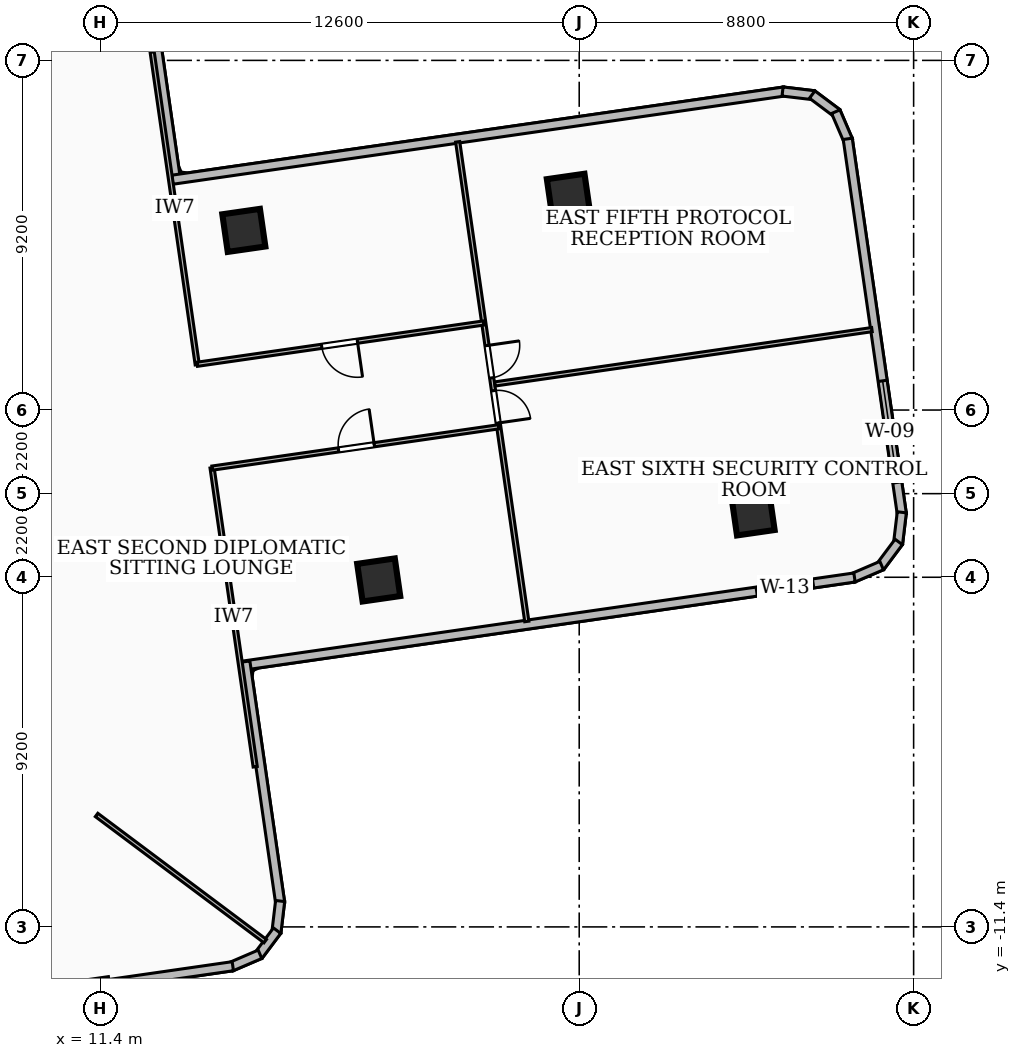
"""IFC4 building model, lengths in metres.
Left out: names, types, materials, properties, quantities, classifications, styles, units other than length and angle.
Written with IfcOpenShell. Run it as: python <this file> out.ifc"""

import sys

from ifc_helpers import new_model, si_unit, direction, frame, frame_2d, origin, origin_2d, place, context, subcontext, project, spatial, rectangle, extrude, element, fill, save


model = new_model("IFC4")
c1 = context("Model", 3, precision=1e-05, world=origin(), true_north=direction((0.0, 1.0)))
c2 = subcontext(c1, "Body", "Model", "MODEL_VIEW")
j1 = project(units=[si_unit("LENGTHUNIT", "METRE"), si_unit("PLANEANGLEUNIT", "RADIAN")], contexts=[c1])
p1 = place(None, origin())
s1 = spatial("IfcSite", under=j1, at=p1, CompositionType="ELEMENT")
p2 = place(p1, origin())
s2 = spatial("IfcBuilding", under=s1, at=p2, CompositionType="ELEMENT")
p3 = place(p2, frame((0.0, 0.0, 89.28)))
s3 = spatial("IfcBuildingStorey", under=s2, at=p3, CompositionType="ELEMENT", Elevation=89.28)
for number, where, z_axis, x_axis in (
    (1, (18.724, -2.271, 0.0), (0.0, 0.0, 1.0), (0.99, 0.143, 0.0)),
    (2, (15.175, 6.927, 0.0), (0.0, 0.0, 1.0), (0.99, 0.143, 0.0)),
    (3, (28.576, -0.533, 0.0), (0.0, 0.0, 1.0), (0.99, 0.143, 0.0)),
    (4, (23.715, 7.851, 0.0), (0.0, 0.0, 1.0), (0.99, 0.143, 0.0)),
):
    element("IfcColumn", number, at=place(p3, frame(where, z_axis=z_axis, x_axis=x_axis)), inside=s3, PredefinedType="COLUMN", context=c2, shape_type="SweptSolid", body=[
        extrude(rectangle(XDim=1.0, YDim=1.0, at=origin_2d()), origin(), (0.0, 0.0, 1.0), 3.6),
    ])
p4 = place(p3, frame((12.434, 14.885, 0.0), z_axis=(0.0, 0.0, 1.0), x_axis=(0.142692500085, -0.989767068769, 0.0)))
e5 = element("IfcWall", 5, at=p4, inside=s3, PredefinedType="SOLIDWALL", context=c2, shape_type="SweptSolid", body=[
    extrude(rectangle(XDim=6.775, YDim=0.24, at=frame_2d((3.388, 0.0))), origin(), (0.0, 0.0, 1.0), 2.644),
])
p5 = place(p3, frame((13.292, 8.26, 0.0), z_axis=(0.0, 0.0, 1.0), x_axis=(0.989770197797, 0.142670794326, 0.0)))
e6 = element("IfcWall", 6, at=p5, inside=s3, PredefinedType="SOLIDWALL", context=c2, shape_type="SweptSolid", body=[
    extrude(rectangle(XDim=16.275, YDim=0.24, at=frame_2d((8.138, 0.0))), origin(), (0.0, 0.0, 1.0), 2.644),
])
p6 = place(p3, frame((29.351, 10.581, 0.0), z_axis=(0.0, 0.0, 1.0), x_axis=(0.992997305963, -0.118136998224, 0.0)))
e7 = element("IfcWall", 7, at=p6, inside=s3, PredefinedType="SOLIDWALL", context=c2, shape_type="SweptSolid", body=[
    extrude(rectangle(XDim=0.831, YDim=0.24, at=frame_2d((0.416, 0.0))), origin(), (0.0, 0.0, 1.0), 3.34),
])
p7 = place(p3, frame((30.131, 10.501, 0.0), z_axis=(0.0, 0.0, 1.0), x_axis=(0.800072018724, -0.599903963027, 0.0)))
e8 = element("IfcWall", 8, at=p7, inside=s3, PredefinedType="SOLIDWALL", context=c2, shape_type="SweptSolid", body=[
    extrude(rectangle(XDim=0.813, YDim=0.24, at=frame_2d((0.407, 0.0))), origin(), (0.0, 0.0, 1.0), 3.34),
])
p8 = place(p3, frame((30.752, 10.051, 0.0), z_axis=(0.0, 0.0, 1.0), x_axis=(0.395089773053, -0.91864251547, 0.0)))
e9 = element("IfcWall", 9, at=p8, inside=s3, PredefinedType="SOLIDWALL", context=c2, shape_type="SweptSolid", body=[
    extrude(rectangle(XDim=0.831, YDim=0.24, at=frame_2d((0.415, 0.0))), origin(), (0.0, 0.0, 1.0), 3.34),
])
p9 = place(p3, frame((31.066, 9.336, 0.0), z_axis=(0.0, 0.0, 1.0), x_axis=(0.142705661552, -0.98976517122, 0.0)))
e10 = element("IfcWall", 10, at=p9, inside=s3, PredefinedType="SOLIDWALL", context=c2, shape_type="SweptSolid", body=[
    extrude(rectangle(XDim=9.979, YDim=0.24, at=frame_2d((4.99, 0.0))), origin(), (0.0, 0.0, 1.0), 3.34),
])
p10 = place(p9, frame((6.434, 0.0, 0.85)))
e11 = element("IfcOpeningElement", 11, at=p10, cuts=e10, PredefinedType="OPENING", context=c2, shape_type="SweptSolid", body=[
    extrude(rectangle(XDim=2.7, YDim=1.65, at=frame_2d((1.35, 0.825))), frame((0.0, 0.13, 0.0), z_axis=(0.0, -1.0, 0.0), x_axis=(1.0, 0.0, 0.0)), (0.0, 0.0, 1.0), 0.26),
])
p11 = place(p3, frame((32.489, -0.491, 0.0), z_axis=(0.0, 0.0, 1.0), x_axis=(-0.119295842971, -0.992858752215, 0.0)))
e12 = element("IfcWall", 12, at=p11, inside=s3, PredefinedType="SOLIDWALL", context=c2, shape_type="SweptSolid", body=[
    extrude(rectangle(XDim=0.831, YDim=0.24, at=frame_2d((0.416, 0.0))), origin(), (0.0, 0.0, 1.0), 3.34),
])
p12 = place(p3, frame((32.408, -1.271, 0.0), z_axis=(0.0, 0.0, 1.0), x_axis=(-0.598415049045, -0.801186263659, 0.0)))
e13 = element("IfcWall", 13, at=p12, inside=s3, PredefinedType="SOLIDWALL", context=c2, shape_type="SweptSolid", body=[
    extrude(rectangle(XDim=0.814, YDim=0.24, at=frame_2d((0.407, 0.0))), origin(), (0.0, 0.0, 1.0), 3.34),
])
p13 = place(p3, frame((31.959, -1.893, 0.0), z_axis=(0.0, 0.0, 1.0), x_axis=(-0.919175455153, -0.393848299024, 0.0)))
e14 = element("IfcWall", 14, at=p13, inside=s3, PredefinedType="SOLIDWALL", context=c2, shape_type="SweptSolid", body=[
    extrude(rectangle(XDim=0.83, YDim=0.24, at=frame_2d((0.415, 0.0))), origin(), (0.0, 0.0, 1.0), 3.34),
])
p14 = place(p3, frame((31.244, -2.206, 0.0), z_axis=(0.0, 0.0, 1.0), x_axis=(-0.989771419035, -0.142662321802, 0.0)))
e15 = element("IfcWall", 15, at=p14, inside=s3, PredefinedType="SOLIDWALL", context=c2, shape_type="SweptSolid", body=[
    extrude(rectangle(XDim=16.276, YDim=0.24, at=frame_2d((8.138, 0.0))), origin(), (0.0, 0.0, 1.0), 3.34),
])
p15 = place(p14, frame((1.1, 0.0, 0.85)))
e16 = element("IfcOpeningElement", 16, at=p15, cuts=e15, PredefinedType="OPENING", context=c2, shape_type="SweptSolid", body=[
    extrude(rectangle(XDim=1.5, YDim=1.8, at=frame_2d((0.75, 0.9))), frame((0.0, 0.13, 0.0), z_axis=(0.0, -1.0, 0.0), x_axis=(1.0, 0.0, 0.0)), (0.0, 0.0, 1.0), 0.26),
])
p16 = place(p3, frame((15.215, -4.419, 0.0), z_axis=(0.0, 0.0, 1.0), x_axis=(0.14277438433, -0.989755260243, 0.0)))
e17 = element("IfcWall", 17, at=p16, inside=s3, PredefinedType="SOLIDWALL", context=c2, shape_type="SweptSolid", body=[
    extrude(rectangle(XDim=6.416, YDim=0.24, at=frame_2d((3.208, 0.0))), origin(), (0.0, 0.0, 1.0), 3.34),
])
p17 = place(p3, frame((16.13, -10.719, 0.0), z_axis=(0.0, 0.0, 1.0), x_axis=(-0.117847211411, -0.993031739051, 0.0)))
e18 = element("IfcWall", 18, at=p17, inside=s3, PredefinedType="SOLIDWALL", context=c2, shape_type="SweptSolid", body=[
    extrude(rectangle(XDim=0.831, YDim=0.24, at=frame_2d((0.416, 0.0))), origin(), (0.0, 0.0, 1.0), 3.34),
])
p18 = place(p3, frame((16.05, -11.499, 0.0), z_axis=(0.0, 0.0, 1.0), x_axis=(-0.599903963027, -0.800072018724, 0.0)))
e19 = element("IfcWall", 19, at=p18, inside=s3, PredefinedType="SOLIDWALL", context=c2, shape_type="SweptSolid", body=[
    extrude(rectangle(XDim=0.813, YDim=0.24, at=frame_2d((0.407, 0.0))), origin(), (0.0, 0.0, 1.0), 3.34),
])
p19 = place(p3, frame((15.6, -12.12, 0.0), z_axis=(0.0, 0.0, 1.0), x_axis=(-0.918795004047, -0.394735025731, 0.0)))
e20 = element("IfcWall", 20, at=p19, inside=s3, PredefinedType="SOLIDWALL", context=c2, shape_type="SweptSolid", body=[
    extrude(rectangle(XDim=0.831, YDim=0.24, at=frame_2d((0.415, 0.0))), origin(), (0.0, 0.0, 1.0), 3.34),
])
p20 = place(p3, frame((14.885, -12.434, 0.0), z_axis=(0.0, 0.0, 1.0), x_axis=(-0.989767068769, -0.142692500085, 0.0)))
e21 = element("IfcWall", 21, at=p20, inside=s3, PredefinedType="SOLIDWALL", context=c2, shape_type="SweptSolid", body=[
    extrude(rectangle(XDim=6.775, YDim=0.24, at=frame_2d((3.388, 0.0))), origin(), (0.0, 0.0, 1.0), 3.34),
])
p21 = place(p3, frame((7.766, 10.38, 0.0), z_axis=(0.0, 0.0, 1.0), x_axis=(0.598966195252, 0.800774310867, 0.0)))
e22 = element("IfcWall", 22, at=p21, inside=s3, PredefinedType="PARTITIONING", context=c2, shape_type="SweptSolid", body=[
    extrude(rectangle(XDim=6.691, YDim=0.11, at=frame_2d((3.346, 0.0))), origin(), (0.0, 0.0, 1.0), 2.644),
])
p22 = place(p3, frame((11.3, -8.454, 0.0), z_axis=(0.0, 0.0, 1.0), x_axis=(0.80074999449, -0.598998703107, 0.0)))
e23 = element("IfcWall", 23, at=p22, inside=s3, PredefinedType="PARTITIONING", context=c2, shape_type="SweptSolid", body=[
    extrude(rectangle(XDim=5.542, YDim=0.11, at=frame_2d((2.771, 0.0))), origin(), (0.0, 0.0, 1.0), 3.34),
])
p23 = place(p3, frame((13.949, 3.394, 0.0), z_axis=(0.0, 0.0, 1.0), x_axis=(-0.142725091033, 0.989762369657, 0.0)))
e24 = element("IfcWall", 24, at=p23, inside=s3, PredefinedType="PARTITIONING", context=c2, shape_type="SweptSolid", body=[
    extrude(rectangle(XDim=8.31, YDim=0.11, at=frame_2d((4.155, 0.0))), origin(), (0.0, 0.0, 1.0), 2.486),
])
p24 = place(p3, frame((15.474, -7.186, 0.0), z_axis=(0.0, 0.0, 1.0), x_axis=(-0.142779920322, 0.989754461648, 0.0)))
e25 = element("IfcWall", 25, at=p24, inside=s3, PredefinedType="PARTITIONING", context=c2, shape_type="SweptSolid", body=[
    extrude(rectangle(XDim=7.949, YDim=0.11, at=frame_2d((3.975, 0.0))), origin(), (0.0, 0.0, 1.0), 2.486),
])
p25 = place(p3, frame((21.489, 4.491, 0.0), z_axis=(0.0, 0.0, 1.0), x_axis=(-0.989774445133, -0.142641325577, 0.0)))
e26 = element("IfcWall", 26, at=p25, inside=s3, PredefinedType="PARTITIONING", context=c2, shape_type="SweptSolid", body=[
    extrude(rectangle(XDim=7.62, YDim=0.11, at=frame_2d((3.81, 0.0))), origin(), (0.0, 0.0, 1.0), 3.34),
])
p26 = place(p25, frame((3.36, 0.0, 0.0)))
e27 = element("IfcOpeningElement", 27, at=p26, cuts=e26, PredefinedType="OPENING", context=c2, shape_type="SweptSolid", body=[
    extrude(rectangle(XDim=0.95, YDim=2.08, at=frame_2d((0.475, 1.04))), frame((0.0, 0.065, 0.0), z_axis=(0.0, -1.0, 0.0), x_axis=(1.0, 0.0, 0.0)), (0.0, 0.0, 1.0), 0.13),
])
p27 = place(p3, frame((14.341, 0.672, 0.0), z_axis=(0.0, 0.0, 1.0), x_axis=(0.989774445133, 0.142641325577, 0.0)))
e28 = element("IfcWall", 28, at=p27, inside=s3, PredefinedType="PARTITIONING", context=c2, shape_type="SweptSolid", body=[
    extrude(rectangle(XDim=7.62, YDim=0.11, at=frame_2d((3.81, 0.0))), origin(), (0.0, 0.0, 1.0), 3.34),
])
p28 = place(p27, frame((3.36, 0.0, 0.0)))
e29 = element("IfcOpeningElement", 29, at=p28, cuts=e28, PredefinedType="OPENING", context=c2, shape_type="SweptSolid", body=[
    extrude(rectangle(XDim=0.95, YDim=2.08, at=frame_2d((0.475, 1.04))), frame((0.0, 0.065, 0.0), z_axis=(0.0, -1.0, 0.0), x_axis=(1.0, 0.0, 0.0)), (0.0, 0.0, 1.0), 0.13),
])
p29 = place(p3, frame((21.781, 2.886, 0.0), z_axis=(0.0, 0.0, 1.0), x_axis=(0.989773870341, 0.142645313942, 0.0)))
e30 = element("IfcWall", 30, at=p29, inside=s3, PredefinedType="PARTITIONING", context=c2, shape_type="SweptSolid", body=[
    extrude(rectangle(XDim=10.024, YDim=0.11, at=frame_2d((5.012, 0.0))), origin(), (0.0, 0.0, 1.0), 2.832),
])
p30 = place(p3, frame((20.802, 9.257, 0.0), z_axis=(0.0, 0.0, 1.0), x_axis=(0.142667743944, -0.98977063749, 0.0)))
e31 = element("IfcWall", 31, at=p30, inside=s3, PredefinedType="PARTITIONING", context=c2, shape_type="SweptSolid", body=[
    extrude(rectangle(XDim=12.75, YDim=0.11, at=frame_2d((6.375, 0.0))), origin(), (0.0, 0.0, 1.0), 2.486),
])
p31 = place(p30, frame((6.615, 0.0, 0.0)))
e32 = element("IfcOpeningElement", 32, at=p31, cuts=e31, PredefinedType="OPENING", context=c2, shape_type="SweptSolid", body=[
    extrude(rectangle(XDim=0.86, YDim=2.04, at=frame_2d((0.43, 1.02))), frame((0.0, 0.065, 0.0), z_axis=(0.0, -1.0, 0.0), x_axis=(1.0, 0.0, 0.0)), (0.0, 0.0, 1.0), 0.13),
])
p32 = place(p30, frame((5.415, 0.0, 0.0)))
e33 = element("IfcOpeningElement", 33, at=p32, cuts=e31, PredefinedType="OPENING", context=c2, shape_type="SweptSolid", body=[
    extrude(rectangle(XDim=0.86, YDim=2.04, at=frame_2d((0.43, 1.02))), frame((0.0, 0.065, 0.0), z_axis=(0.0, -1.0, 0.0), x_axis=(1.0, 0.0, 0.0)), (0.0, 0.0, 1.0), 0.13),
])
p33 = place(p3, frame((3.394, -13.949, 0.0), z_axis=(0.0, 0.0, 1.0), x_axis=(0.989762369657, 0.142725091033, 0.0)))
e34 = element("IfcWall", 34, at=p33, inside=s3, PredefinedType="PARTITIONING", context=c2, shape_type="SweptSolid", body=[
    extrude(rectangle(XDim=8.31, YDim=0.11, at=frame_2d((4.155, 0.0))), origin(), (0.0, 0.0, 1.0), 2.486),
])
p34 = place(p10, origin())
e35 = element("IfcWindow", 35, at=p34, inside=s3, PartitioningType="SINGLE_PANEL", PredefinedType="WINDOW", context=c2, shape_type="SweptSolid", body=[
    extrude(rectangle(XDim=2.7, YDim=1.65, at=frame_2d((1.35, 0.825))), frame((0.0, 0.03, 0.0), z_axis=(0.0, -1.0, 0.0), x_axis=(1.0, 0.0, 0.0)), (0.0, 0.0, 1.0), 0.06),
])
fill(e11, e35)
p35 = place(p15, origin())
e36 = element("IfcWindow", 36, at=p35, inside=s3, PartitioningType="SINGLE_PANEL", PredefinedType="WINDOW", context=c2, shape_type="SweptSolid", body=[
    extrude(rectangle(XDim=1.5, YDim=1.8, at=frame_2d((0.75, 0.9))), frame((0.0, 0.03, 0.0), z_axis=(0.0, -1.0, 0.0), x_axis=(1.0, 0.0, 0.0)), (0.0, 0.0, 1.0), 0.06),
])
fill(e16, e36)
p36 = place(p26, origin())
e37 = element("IfcDoor", 37, at=p36, inside=s3, OperationType="SINGLE_SWING_LEFT", PredefinedType="DOOR", context=c2, shape_type="SweptSolid", body=[
    extrude(rectangle(XDim=0.95, YDim=2.08, at=frame_2d((0.475, 1.04))), frame((0.0, 0.025, 0.0), z_axis=(0.0, -1.0, 0.0), x_axis=(1.0, 0.0, 0.0)), (0.0, 0.0, 1.0), 0.05),
])
fill(e27, e37)
p37 = place(p28, origin())
e38 = element("IfcDoor", 38, at=p37, inside=s3, OperationType="SINGLE_SWING_RIGHT", PredefinedType="DOOR", context=c2, shape_type="SweptSolid", body=[
    extrude(rectangle(XDim=0.95, YDim=2.08, at=frame_2d((0.475, 1.04))), frame((0.0, 0.025, 0.0), z_axis=(0.0, -1.0, 0.0), x_axis=(1.0, 0.0, 0.0)), (0.0, 0.0, 1.0), 0.05),
])
fill(e29, e38)
p38 = place(p31, origin())
e39 = element("IfcDoor", 39, at=p38, inside=s3, OperationType="SINGLE_SWING_RIGHT", PredefinedType="DOOR", context=c2, shape_type="SweptSolid", body=[
    extrude(rectangle(XDim=0.86, YDim=2.04, at=frame_2d((0.43, 1.02))), frame((0.0, 0.025, 0.0), z_axis=(0.0, -1.0, 0.0), x_axis=(1.0, 0.0, 0.0)), (0.0, 0.0, 1.0), 0.05),
])
fill(e32, e39)
p39 = place(p32, origin())
e40 = element("IfcDoor", 40, at=p39, inside=s3, OperationType="SINGLE_SWING_LEFT", PredefinedType="DOOR", context=c2, shape_type="SweptSolid", body=[
    extrude(rectangle(XDim=0.86, YDim=2.04, at=frame_2d((0.43, 1.02))), frame((0.0, 0.025, 0.0), z_axis=(0.0, -1.0, 0.0), x_axis=(1.0, 0.0, 0.0)), (0.0, 0.0, 1.0), 0.05),
])
fill(e33, e40)
save(model, sys.argv[1])
